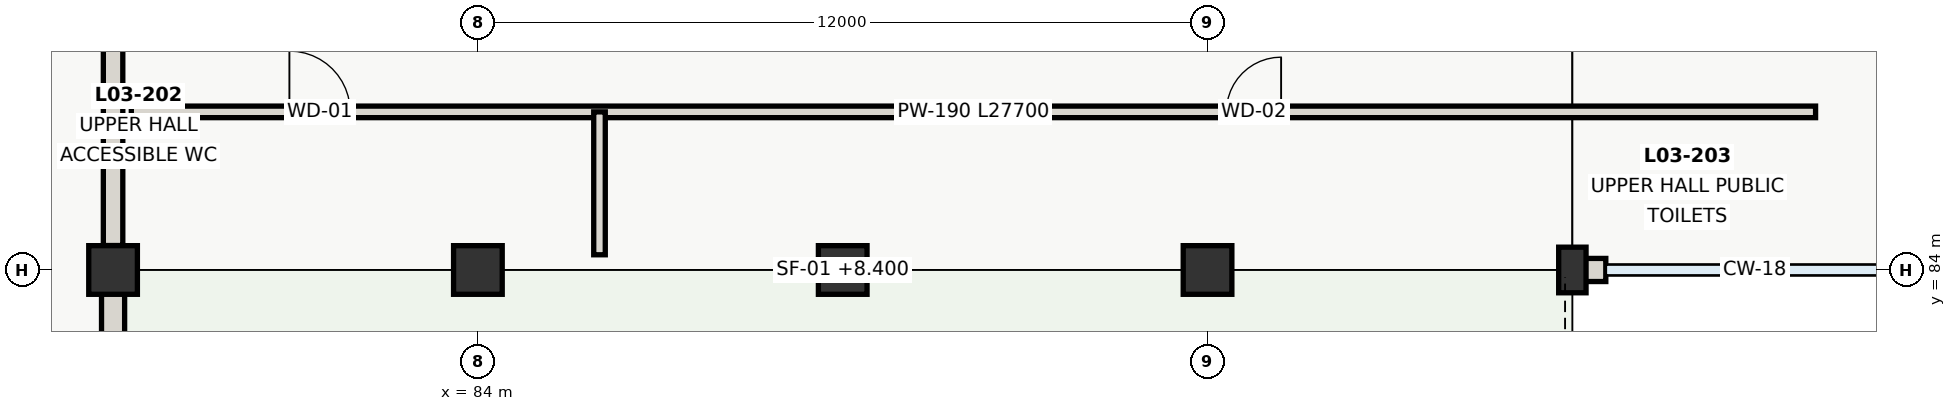
"""IFC4 building model, lengths in metres.
Left out: names, types, materials, properties, quantities, classifications, styles, units other than length and angle.
Written with IfcOpenShell. Run it as: python <this file> out.ifc"""

import sys

from ifc_helpers import new_model, si_unit, direction, frame, frame_2d, origin, origin_2d, place, context, subcontext, project, spatial, rectangle, extrude, element, fill, save


model = new_model("IFC4")
c1 = context("Model", 3, precision=1e-05, world=origin(), true_north=direction((0.0, 1.0)))
c2 = subcontext(c1, "Body", "Model", "MODEL_VIEW")
j1 = project(units=[si_unit("LENGTHUNIT", "METRE"), si_unit("PLANEANGLEUNIT", "RADIAN")], contexts=[c1])
p1 = place(None, origin())
s1 = spatial("IfcSite", under=j1, at=p1, CompositionType="ELEMENT")
p2 = place(p1, origin())
s2 = spatial("IfcBuilding", under=s1, at=p2, CompositionType="ELEMENT")
p3 = place(p2, frame((0.0, 0.0, 8.4)))
s3 = spatial("IfcBuildingStorey", under=s2, at=p3, CompositionType="ELEMENT", Elevation=8.4)
for number, where, z_axis, x_axis in (
    (1, (78.0, 84.0, 0.0), (0.0, 0.0, 1.0), (1.0, 0.0, 0.0)),
    (2, (84.0, 84.0, 0.0), (0.0, 0.0, 1.0), (1.0, 0.0, 0.0)),
    (3, (90.0, 84.0, 0.0), (0.0, 0.0, 1.0), (1.0, 0.0, 0.0)),
    (4, (96.0, 84.0, 0.0), (0.0, 0.0, 1.0), (1.0, 0.0, 0.0)),
):
    element("IfcColumn", number, at=place(p3, frame(where, z_axis=z_axis, x_axis=x_axis)), inside=s3, PredefinedType="COLUMN", context=c2, shape_type="SweptSolid", body=[
        extrude(rectangle(XDim=0.8, YDim=0.8, at=origin_2d()), origin(), (0.0, 0.0, 1.0), 4.2),
    ])
p4 = place(p3, frame((102.0, 84.0, 0.0), z_axis=(0.0, 0.0, 1.0), x_axis=(1.0, 0.0, 0.0)))
e5 = element("IfcColumn", 5, at=p4, inside=s3, PredefinedType="PILASTER", context=c2, shape_type="SweptSolid", body=[
    extrude(rectangle(XDim=0.45, YDim=0.75, at=origin_2d()), origin(), (0.0, 0.0, 1.0), 4.2),
])
p5 = place(p3, frame((102.55, 84.0, 0.0), z_axis=(0.0, 0.0, 1.0), x_axis=(-1.0, 0.0, 0.0)))
e6 = element("IfcWall", 6, at=p5, inside=s3, PredefinedType="SOLIDWALL", context=c2, shape_type="SweptSolid", body=[
    extrude(rectangle(XDim=0.55, YDim=0.38, at=frame_2d((0.275, 0.0))), origin(), (0.0, 0.0, 1.0), 3.45),
])
p6 = place(p3, frame((78.0, 84.0, 0.0), z_axis=(0.0, 0.0, 1.0), x_axis=(0.0, -1.0, 0.0)))
e7 = element("IfcWall", 7, at=p6, inside=s3, PredefinedType="SOLIDWALL", context=c2, shape_type="SweptSolid", body=[
    extrude(rectangle(XDim=6.0, YDim=0.38, at=frame_2d((3.0, 0.0))), origin(), (0.0, 0.0, 1.0), 4.2),
])
p7 = place(p6, frame((2.35, 0.0, 0.9)))
e8 = element("IfcOpeningElement", 8, at=p7, cuts=e7, PredefinedType="OPENING", context=c2, shape_type="SweptSolid", body=[
    extrude(rectangle(XDim=1.3, YDim=1.7, at=frame_2d((0.65, 0.85))), frame((0.0, 0.2, 0.0), z_axis=(0.0, -1.0, 0.0), x_axis=(1.0, 0.0, 0.0)), (0.0, 0.0, 1.0), 0.4),
])
p8 = place(p3, frame((78.0, 84.402, 0.0), z_axis=(0.0, 0.0, 1.0), x_axis=(0.0, 1.0, 0.0)))
e9 = element("IfcWall", 9, at=p8, inside=s3, PredefinedType="SHEAR", context=c2, shape_type="SweptSolid", body=[
    extrude(rectangle(XDim=17.416, YDim=0.32, at=frame_2d((8.708, 0.0))), origin(), (0.0, 0.0, 1.0), 3.8),
])
p9 = place(p8, frame((6.948, 0.0, 0.0)))
e10 = element("IfcOpeningElement", 10, at=p9, cuts=e9, PredefinedType="OPENING", context=c2, shape_type="SweptSolid", body=[
    extrude(rectangle(XDim=2.5, YDim=2.4, at=frame_2d((1.25, 1.2))), frame((0.0, 0.17, 0.0), z_axis=(0.0, -1.0, 0.0), x_axis=(1.0, 0.0, 0.0)), (0.0, 0.0, 1.0), 0.34),
])
p10 = place(p3, frame((78.3, 86.6, 0.0), z_axis=(0.0, 0.0, 1.0), x_axis=(1.0, 0.0, 0.0)))
e11 = element("IfcWall", 11, at=p10, inside=s3, PredefinedType="PLUMBINGWALL", context=c2, shape_type="SweptSolid", body=[
    extrude(rectangle(XDim=27.7, YDim=0.19, at=frame_2d((13.85, 0.0))), origin(), (0.0, 0.0, 1.0), 3.75),
])
p11 = place(p10, frame((2.6, 0.0, 0.0)))
e12 = element("IfcOpeningElement", 12, at=p11, cuts=e11, PredefinedType="OPENING", context=c2, shape_type="SweptSolid", body=[
    extrude(rectangle(XDim=1.0, YDim=2.1, at=frame_2d((0.5, 1.05))), frame((0.0, 0.105, 0.0), z_axis=(0.0, -1.0, 0.0), x_axis=(1.0, 0.0, 0.0)), (0.0, 0.0, 1.0), 0.21),
])
p12 = place(p10, frame((18.01, 0.0, 0.0)))
e13 = element("IfcOpeningElement", 13, at=p12, cuts=e11, PredefinedType="OPENING", context=c2, shape_type="SweptSolid", body=[
    extrude(rectangle(XDim=0.9, YDim=2.05, at=frame_2d((0.45, 1.025))), frame((0.0, 0.105, 0.0), z_axis=(0.0, -1.0, 0.0), x_axis=(1.0, 0.0, 0.0)), (0.0, 0.0, 1.0), 0.21),
])
p13 = place(p3, frame((86.0, 84.25, 0.0), z_axis=(0.0, 0.0, 1.0), x_axis=(0.0, 1.0, 0.0)))
e14 = element("IfcWall", 14, at=p13, inside=s3, PredefinedType="PLUMBINGWALL", context=c2, shape_type="SweptSolid", body=[
    extrude(rectangle(XDim=2.35, YDim=0.19, at=frame_2d((1.175, 0.0))), origin(), (0.0, 0.0, 1.0), 3.75),
])
p14 = place(p11, origin())
e15 = element("IfcDoor", 15, at=p14, inside=s3, OperationType="SINGLE_SWING_LEFT", PredefinedType="DOOR", context=c2, shape_type="SweptSolid", body=[
    extrude(rectangle(XDim=1.0, YDim=2.1, at=frame_2d((0.5, 1.05))), frame((0.0, 0.025, 0.0), z_axis=(0.0, -1.0, 0.0), x_axis=(1.0, 0.0, 0.0)), (0.0, 0.0, 1.0), 0.05),
])
fill(e12, e15)
p15 = place(p12, origin())
e16 = element("IfcDoor", 16, at=p15, inside=s3, OperationType="SINGLE_SWING_RIGHT", PredefinedType="DOOR", context=c2, shape_type="SweptSolid", body=[
    extrude(rectangle(XDim=0.9, YDim=2.05, at=frame_2d((0.45, 1.025))), frame((0.0, 0.025, 0.0), z_axis=(0.0, -1.0, 0.0), x_axis=(1.0, 0.0, 0.0)), (0.0, 0.0, 1.0), 0.05),
])
fill(e13, e16)
save(model, sys.argv[1])
